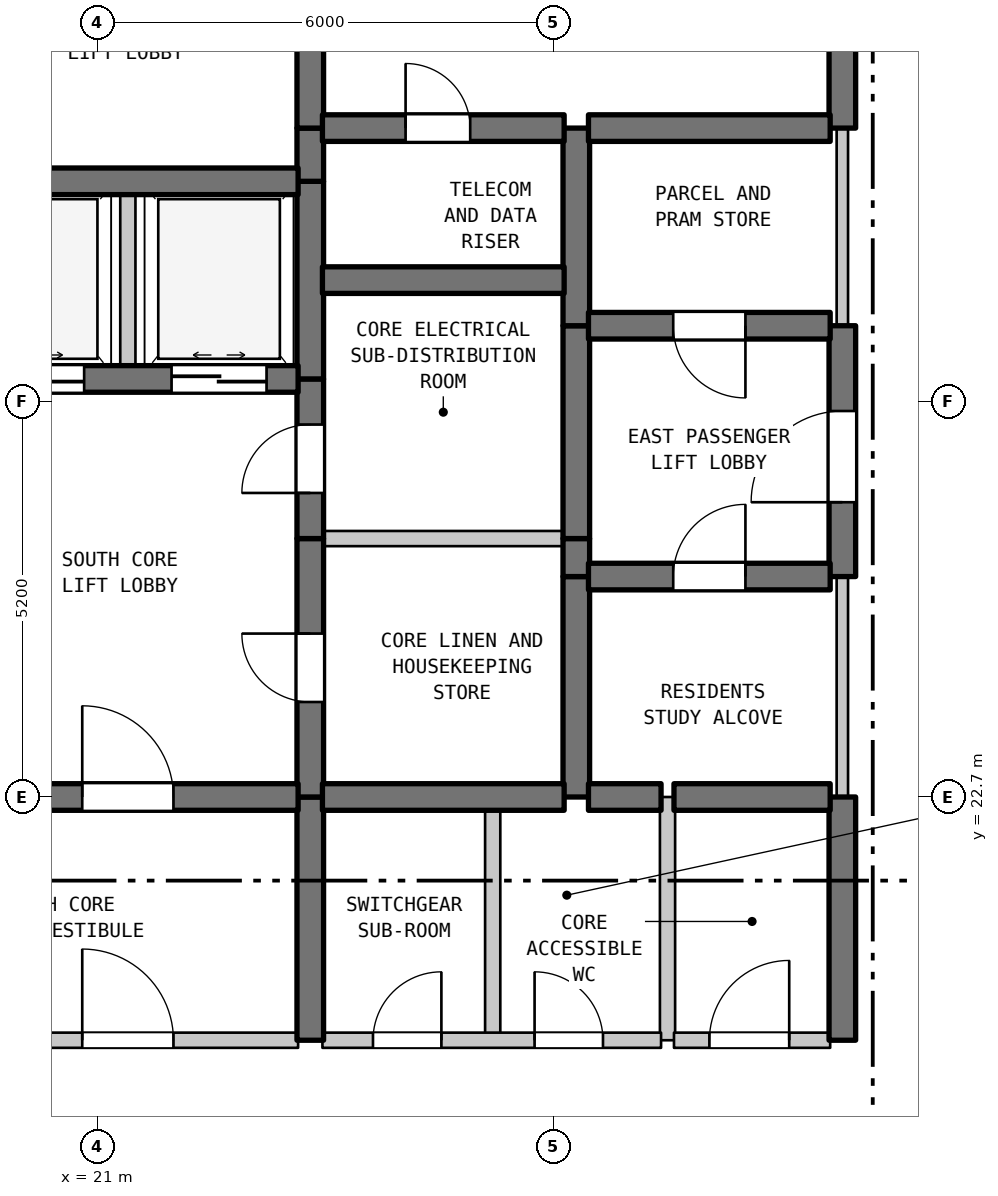
"""IFC4 building model, lengths in metres.
Left out: names, types, materials, properties, quantities, classifications, styles, units other than length and angle.
Written with IfcOpenShell. Run it as: python <this file> out.ifc"""

import sys

from ifc_helpers import new_model, si_unit, direction, frame, frame_2d, origin, place, context, subcontext, project, spatial, rectangle, extrude, element, fill, save


model = new_model("IFC4")
c1 = context("Model", 3, precision=1e-05, world=origin(), true_north=direction((0.0, 1.0)))
c2 = subcontext(c1, "Body", "Model", "MODEL_VIEW")
j1 = project(units=[si_unit("LENGTHUNIT", "METRE"), si_unit("PLANEANGLEUNIT", "RADIAN")], contexts=[c1])
p1 = place(None, origin())
s1 = spatial("IfcSite", under=j1, at=p1, CompositionType="ELEMENT")
p2 = place(p1, origin())
s2 = spatial("IfcBuilding", under=s1, at=p2, CompositionType="ELEMENT")
p3 = place(p2, frame((0.0, 0.0, 273.2)))
s3 = spatial("IfcBuildingStorey", under=s2, at=p3, CompositionType="ELEMENT", Elevation=273.2)
p4 = place(p3, frame((21.4, 28.2, 0.0), z_axis=(0.0, 0.0, 1.0), x_axis=(0.0, 1.0, 0.0)))
e1 = element("IfcWall", 1, at=p4, inside=s3, PredefinedType="STANDARD", context=c2, shape_type="SweptSolid", body=[
    extrude(rectangle(XDim=2.6, YDim=0.2, at=frame_2d((1.3, 0.0))), origin(), (0.0, 0.0, 1.0), 3.39),
])
p5 = place(p3, frame((23.8, 19.5, 0.0), z_axis=(0.0, 0.0, 1.0), x_axis=(0.0, 1.0, 0.0)))
e2 = element("IfcWall", 2, at=p5, inside=s3, PredefinedType="SHEAR", context=c2, shape_type="SweptSolid", body=[
    extrude(rectangle(XDim=3.2, YDim=0.35, at=frame_2d((1.6, 0.0))), origin(), (0.0, 0.0, 1.0), 3.39),
])
p6 = place(p3, frame((23.8, 22.7, 0.0), z_axis=(0.0, 0.0, 1.0), x_axis=(0.0, 1.0, 0.0)))
e3 = element("IfcWall", 3, at=p6, inside=s3, PredefinedType="SHEAR", context=c2, shape_type="SweptSolid", body=[
    extrude(rectangle(XDim=3.4, YDim=0.35, at=frame_2d((1.7, 0.0))), origin(), (0.0, 0.0, 1.0), 3.39),
])
p7 = place(p6, frame((1.25, 0.0, 0.0)))
e4 = element("IfcOpeningElement", 4, at=p7, cuts=e3, PredefinedType="OPENING", context=c2, shape_type="SweptSolid", body=[
    extrude(rectangle(XDim=0.9, YDim=2.15, at=frame_2d((0.45, 1.075))), frame((0.0, 0.185, 0.0), z_axis=(0.0, -1.0, 0.0), x_axis=(1.0, 0.0, 0.0)), (0.0, 0.0, 1.0), 0.37),
])
p8 = place(p3, frame((23.8, 26.1, 0.0), z_axis=(0.0, 0.0, 1.0), x_axis=(0.0, 1.0, 0.0)))
e5 = element("IfcWall", 5, at=p8, inside=s3, PredefinedType="SHEAR", context=c2, shape_type="SweptSolid", body=[
    extrude(rectangle(XDim=2.1, YDim=0.35, at=frame_2d((1.05, 0.0))), origin(), (0.0, 0.0, 1.0), 3.39),
])
p9 = place(p8, frame((0.6, 0.0, 0.0)))
e6 = element("IfcOpeningElement", 6, at=p9, cuts=e5, PredefinedType="OPENING", context=c2, shape_type="SweptSolid", body=[
    extrude(rectangle(XDim=0.9, YDim=2.15, at=frame_2d((0.45, 1.075))), frame((0.0, 0.185, 0.0), z_axis=(0.0, -1.0, 0.0), x_axis=(1.0, 0.0, 0.0)), (0.0, 0.0, 1.0), 0.37),
])
p10 = place(p3, frame((23.8, 28.2, 0.0), z_axis=(0.0, 0.0, 1.0), x_axis=(0.0, 1.0, 0.0)))
e7 = element("IfcWall", 7, at=p10, inside=s3, PredefinedType="SHEAR", context=c2, shape_type="SweptSolid", body=[
    extrude(rectangle(XDim=2.6, YDim=0.35, at=frame_2d((1.3, 0.0))), origin(), (0.0, 0.0, 1.0), 3.39),
])
p11 = place(p3, frame((23.8, 30.8, 0.0), z_axis=(0.0, 0.0, 1.0), x_axis=(0.0, 1.0, 0.0)))
e8 = element("IfcWall", 8, at=p11, inside=s3, PredefinedType="SHEAR", context=c2, shape_type="SweptSolid", body=[
    extrude(rectangle(XDim=0.7, YDim=0.35, at=frame_2d((0.35, 0.0))), origin(), (0.0, 0.0, 1.0), 3.39),
])
p12 = place(p3, frame((23.8, 31.5, 0.0), z_axis=(0.0, 0.0, 1.0), x_axis=(0.0, 1.0, 0.0)))
e9 = element("IfcWall", 9, at=p12, inside=s3, PredefinedType="SHEAR", context=c2, shape_type="SweptSolid", body=[
    extrude(rectangle(XDim=3.5, YDim=0.35, at=frame_2d((1.75, 0.0))), origin(), (0.0, 0.0, 1.0), 3.39),
])
p13 = place(p12, frame((1.127, 0.0, 0.0)))
e10 = element("IfcOpeningElement", 10, at=p13, cuts=e9, PredefinedType="OPENING", context=c2, shape_type="SweptSolid", body=[
    extrude(rectangle(XDim=1.1, YDim=2.15, at=frame_2d((0.55, 1.075))), frame((0.0, 0.185, 0.0), z_axis=(0.0, -1.0, 0.0), x_axis=(1.0, 0.0, 0.0)), (0.0, 0.0, 1.0), 0.37),
])
p14 = place(p3, frame((26.2, 19.5, 0.0), z_axis=(0.0, 0.0, 1.0), x_axis=(0.0, 1.0, 0.0)))
e11 = element("IfcWall", 11, at=p14, inside=s3, PredefinedType="STANDARD", context=c2, shape_type="SweptSolid", body=[
    extrude(rectangle(XDim=3.2, YDim=0.2, at=frame_2d((1.6, 0.0))), origin(), (0.0, 0.0, 1.0), 3.39),
])
p15 = place(p3, frame((27.3, 22.7, 0.0), z_axis=(0.0, 0.0, 1.0), x_axis=(0.0, 1.0, 0.0)))
e12 = element("IfcWall", 12, at=p15, inside=s3, PredefinedType="SHEAR", context=c2, shape_type="SweptSolid", body=[
    extrude(rectangle(XDim=2.9, YDim=0.35, at=frame_2d((1.45, 0.0))), origin(), (0.0, 0.0, 1.0), 3.39),
])
p16 = place(p3, frame((27.3, 25.6, 0.0), z_axis=(0.0, 0.0, 1.0), x_axis=(0.0, 1.0, 0.0)))
e13 = element("IfcWall", 13, at=p16, inside=s3, PredefinedType="SHEAR", context=c2, shape_type="SweptSolid", body=[
    extrude(rectangle(XDim=0.5, YDim=0.35, at=frame_2d((0.25, 0.0))), origin(), (0.0, 0.0, 1.0), 3.39),
])
p17 = place(p3, frame((27.3, 26.1, 0.0), z_axis=(0.0, 0.0, 1.0), x_axis=(0.0, 1.0, 0.0)))
e14 = element("IfcWall", 14, at=p17, inside=s3, PredefinedType="SHEAR", context=c2, shape_type="SweptSolid", body=[
    extrude(rectangle(XDim=2.8, YDim=0.35, at=frame_2d((1.4, 0.0))), origin(), (0.0, 0.0, 1.0), 3.39),
])
p18 = place(p3, frame((27.3, 28.9, 0.0), z_axis=(0.0, 0.0, 1.0), x_axis=(0.0, 1.0, 0.0)))
e15 = element("IfcWall", 15, at=p18, inside=s3, PredefinedType="SHEAR", context=c2, shape_type="SweptSolid", body=[
    extrude(rectangle(XDim=2.6, YDim=0.35, at=frame_2d((1.3, 0.0))), origin(), (0.0, 0.0, 1.0), 3.39),
])
p19 = place(p3, frame((28.5, 19.5, 0.0), z_axis=(0.0, 0.0, 1.0), x_axis=(0.0, 1.0, 0.0)))
e16 = element("IfcWall", 16, at=p19, inside=s3, PredefinedType="STANDARD", context=c2, shape_type="SweptSolid", body=[
    extrude(rectangle(XDim=3.2, YDim=0.2, at=frame_2d((1.6, 0.0))), origin(), (0.0, 0.0, 1.0), 3.39),
])
p20 = place(p3, frame((30.8, 19.5, 0.0), z_axis=(0.0, 0.0, 1.0), x_axis=(0.0, 1.0, 0.0)))
e17 = element("IfcWall", 17, at=p20, inside=s3, PredefinedType="SHEAR", context=c2, shape_type="SweptSolid", body=[
    extrude(rectangle(XDim=3.2, YDim=0.35, at=frame_2d((1.6, 0.0))), origin(), (0.0, 0.0, 1.0), 3.39),
])
p21 = place(p3, frame((30.8, 22.7, 0.0), z_axis=(0.0, 0.0, 1.0), x_axis=(0.0, 1.0, 0.0)))
e18 = element("IfcWall", 18, at=p21, inside=s3, PredefinedType="STANDARD", context=c2, shape_type="SweptSolid", body=[
    extrude(rectangle(XDim=2.9, YDim=0.15, at=frame_2d((1.45, 0.0))), origin(), (0.0, 0.0, 1.0), 3.39),
])
p22 = place(p3, frame((30.8, 25.6, 0.0), z_axis=(0.0, 0.0, 1.0), x_axis=(0.0, 1.0, 0.0)))
e19 = element("IfcWall", 19, at=p22, inside=s3, PredefinedType="SHEAR", context=c2, shape_type="SweptSolid", body=[
    extrude(rectangle(XDim=3.3, YDim=0.35, at=frame_2d((1.65, 0.0))), origin(), (0.0, 0.0, 1.0), 3.39),
])
p23 = place(p22, frame((0.978, 0.0, 0.0)))
e20 = element("IfcOpeningElement", 20, at=p23, cuts=e19, PredefinedType="OPENING", context=c2, shape_type="SweptSolid", body=[
    extrude(rectangle(XDim=1.2, YDim=2.2, at=frame_2d((0.6, 1.1))), frame((0.0, 0.185, 0.0), z_axis=(0.0, -1.0, 0.0), x_axis=(1.0, 0.0, 0.0)), (0.0, 0.0, 1.0), 0.37),
])
p24 = place(p3, frame((30.8, 28.9, 0.0), z_axis=(0.0, 0.0, 1.0), x_axis=(0.0, 1.0, 0.0)))
e21 = element("IfcWall", 21, at=p24, inside=s3, PredefinedType="STANDARD", context=c2, shape_type="SweptSolid", body=[
    extrude(rectangle(XDim=2.6, YDim=0.15, at=frame_2d((1.3, 0.0))), origin(), (0.0, 0.0, 1.0), 3.39),
])
p25 = place(p3, frame((30.8, 31.5, 0.0), z_axis=(0.0, 0.0, 1.0), x_axis=(0.0, 1.0, 0.0)))
e22 = element("IfcWall", 22, at=p25, inside=s3, PredefinedType="SHEAR", context=c2, shape_type="SweptSolid", body=[
    extrude(rectangle(XDim=3.5, YDim=0.35, at=frame_2d((1.75, 0.0))), origin(), (0.0, 0.0, 1.0), 3.39),
])
p26 = place(p25, frame((1.15, 0.0, 0.0)))
e23 = element("IfcOpeningElement", 23, at=p26, cuts=e22, PredefinedType="OPENING", context=c2, shape_type="SweptSolid", body=[
    extrude(rectangle(XDim=1.2, YDim=2.2, at=frame_2d((0.6, 1.1))), frame((0.0, 0.185, 0.0), z_axis=(0.0, -1.0, 0.0), x_axis=(1.0, 0.0, 0.0)), (0.0, 0.0, 1.0), 0.37),
])
p27 = place(p3, frame((19.16, 19.5, 0.0), z_axis=(0.0, 0.0, 1.0), x_axis=(1.0, 0.0, 0.0)))
e24 = element("IfcWall", 24, at=p27, inside=s3, PredefinedType="STANDARD", context=c2, shape_type="SweptSolid", body=[
    extrude(rectangle(XDim=4.48, YDim=0.2, at=frame_2d((2.24, 0.0))), origin(), (0.0, 0.0, 1.0), 3.39),
])
p28 = place(p27, frame((1.64, 0.0, 0.0)))
e25 = element("IfcOpeningElement", 25, at=p28, cuts=e24, PredefinedType="OPENING", context=c2, shape_type="SweptSolid", body=[
    extrude(rectangle(XDim=1.2, YDim=2.2, at=frame_2d((0.6, 1.1))), frame((0.0, 0.11, 0.0), z_axis=(0.0, -1.0, 0.0), x_axis=(1.0, 0.0, 0.0)), (0.0, 0.0, 1.0), 0.22),
])
p29 = place(p3, frame((23.96, 19.5, 0.0), z_axis=(0.0, 0.0, 1.0), x_axis=(1.0, 0.0, 0.0)))
e26 = element("IfcWall", 26, at=p29, inside=s3, PredefinedType="STANDARD", context=c2, shape_type="SweptSolid", body=[
    extrude(rectangle(XDim=4.455, YDim=0.2, at=frame_2d((2.228, 0.0))), origin(), (0.0, 0.0, 1.0), 3.39),
])
p30 = place(p29, frame((0.665, 0.0, 0.0)))
e27 = element("IfcOpeningElement", 27, at=p30, cuts=e26, PredefinedType="OPENING", context=c2, shape_type="SweptSolid", body=[
    extrude(rectangle(XDim=0.9, YDim=2.15, at=frame_2d((0.45, 1.075))), frame((0.0, 0.11, 0.0), z_axis=(0.0, -1.0, 0.0), x_axis=(1.0, 0.0, 0.0)), (0.0, 0.0, 1.0), 0.22),
])
p31 = place(p29, frame((2.791, 0.0, 0.0)))
e28 = element("IfcOpeningElement", 28, at=p31, cuts=e26, PredefinedType="OPENING", context=c2, shape_type="SweptSolid", body=[
    extrude(rectangle(XDim=0.9, YDim=2.15, at=frame_2d((0.45, 1.075))), frame((0.0, 0.11, 0.0), z_axis=(0.0, -1.0, 0.0), x_axis=(1.0, 0.0, 0.0)), (0.0, 0.0, 1.0), 0.22),
])
p32 = place(p3, frame((28.585, 19.5, 0.0), z_axis=(0.0, 0.0, 1.0), x_axis=(1.0, 0.0, 0.0)))
e29 = element("IfcWall", 29, at=p32, inside=s3, PredefinedType="STANDARD", context=c2, shape_type="SweptSolid", body=[
    extrude(rectangle(XDim=2.055, YDim=0.2, at=frame_2d((1.027, 0.0))), origin(), (0.0, 0.0, 1.0), 3.39),
])
p33 = place(p32, frame((0.466, 0.0, 0.0)))
e30 = element("IfcOpeningElement", 30, at=p33, cuts=e29, PredefinedType="OPENING", context=c2, shape_type="SweptSolid", body=[
    extrude(rectangle(XDim=1.05, YDim=2.15, at=frame_2d((0.525, 1.075))), frame((0.0, 0.11, 0.0), z_axis=(0.0, -1.0, 0.0), x_axis=(1.0, 0.0, 0.0)), (0.0, 0.0, 1.0), 0.22),
])
p34 = place(p3, frame((19.16, 22.7, 0.0), z_axis=(0.0, 0.0, 1.0), x_axis=(1.0, 0.0, 0.0)))
e31 = element("IfcWall", 31, at=p34, inside=s3, PredefinedType="SHEAR", context=c2, shape_type="SweptSolid", body=[
    extrude(rectangle(XDim=4.48, YDim=0.35, at=frame_2d((2.24, 0.0))), origin(), (0.0, 0.0, 1.0), 3.39),
])
p35 = place(p34, frame((1.64, 0.0, 0.0)))
e32 = element("IfcOpeningElement", 32, at=p35, cuts=e31, PredefinedType="OPENING", context=c2, shape_type="SweptSolid", body=[
    extrude(rectangle(XDim=1.2, YDim=2.2, at=frame_2d((0.6, 1.1))), frame((0.0, 0.185, 0.0), z_axis=(0.0, -1.0, 0.0), x_axis=(1.0, 0.0, 0.0)), (0.0, 0.0, 1.0), 0.37),
])
p36 = place(p3, frame((23.96, 22.7, 0.0), z_axis=(0.0, 0.0, 1.0), x_axis=(1.0, 0.0, 0.0)))
e33 = element("IfcWall", 33, at=p36, inside=s3, PredefinedType="SHEAR", context=c2, shape_type="SweptSolid", body=[
    extrude(rectangle(XDim=3.18, YDim=0.35, at=frame_2d((1.59, 0.0))), origin(), (0.0, 0.0, 1.0), 3.39),
])
p37 = place(p3, frame((27.46, 22.7, 0.0), z_axis=(0.0, 0.0, 1.0), x_axis=(1.0, 0.0, 0.0)))
e34 = element("IfcWall", 34, at=p37, inside=s3, PredefinedType="SHEAR", context=c2, shape_type="SweptSolid", body=[
    extrude(rectangle(XDim=0.955, YDim=0.35, at=frame_2d((0.478, 0.0))), origin(), (0.0, 0.0, 1.0), 3.39),
])
p38 = place(p3, frame((28.585, 22.7, 0.0), z_axis=(0.0, 0.0, 1.0), x_axis=(1.0, 0.0, 0.0)))
e35 = element("IfcWall", 35, at=p38, inside=s3, PredefinedType="SHEAR", context=c2, shape_type="SweptSolid", body=[
    extrude(rectangle(XDim=2.055, YDim=0.35, at=frame_2d((1.027, 0.0))), origin(), (0.0, 0.0, 1.0), 3.39),
])
p39 = place(p3, frame((27.46, 25.6, 0.0), z_axis=(0.0, 0.0, 1.0), x_axis=(1.0, 0.0, 0.0)))
e36 = element("IfcWall", 36, at=p39, inside=s3, PredefinedType="SHEAR", context=c2, shape_type="SweptSolid", body=[
    extrude(rectangle(XDim=3.18, YDim=0.35, at=frame_2d((1.59, 0.0))), origin(), (0.0, 0.0, 1.0), 3.39),
])
p40 = place(p39, frame((1.115, 0.0, 0.0)))
e37 = element("IfcOpeningElement", 37, at=p40, cuts=e36, PredefinedType="OPENING", context=c2, shape_type="SweptSolid", body=[
    extrude(rectangle(XDim=0.95, YDim=2.15, at=frame_2d((0.475, 1.075))), frame((0.0, 0.185, 0.0), z_axis=(0.0, -1.0, 0.0), x_axis=(1.0, 0.0, 0.0)), (0.0, 0.0, 1.0), 0.37),
])
p41 = place(p3, frame((23.96, 26.1, 0.0), z_axis=(0.0, 0.0, 1.0), x_axis=(1.0, 0.0, 0.0)))
e38 = element("IfcWall", 38, at=p41, inside=s3, PredefinedType="STANDARD", context=c2, shape_type="SweptSolid", body=[
    extrude(rectangle(XDim=3.18, YDim=0.2, at=frame_2d((1.59, 0.0))), origin(), (0.0, 0.0, 1.0), 3.39),
])
p42 = place(p3, frame((19.16, 28.2, 0.0), z_axis=(0.0, 0.0, 1.0), x_axis=(1.0, 0.0, 0.0)))
e39 = element("IfcWall", 39, at=p42, inside=s3, PredefinedType="SHEAR", context=c2, shape_type="SweptSolid", body=[
    extrude(rectangle(XDim=4.48, YDim=0.35, at=frame_2d((2.24, 0.0))), origin(), (0.0, 0.0, 1.0), 3.39),
])
p43 = place(p42, frame((0.415, 0.0, 0.0)))
e40 = element("IfcOpeningElement", 40, at=p43, cuts=e39, PredefinedType="OPENING", context=c2, shape_type="SweptSolid", body=[
    extrude(rectangle(XDim=1.25, YDim=2.2, at=frame_2d((0.625, 1.1))), frame((0.0, 0.185, 0.0), z_axis=(0.0, -1.0, 0.0), x_axis=(1.0, 0.0, 0.0)), (0.0, 0.0, 1.0), 0.37),
])
p44 = place(p42, frame((2.815, 0.0, 0.0)))
e41 = element("IfcOpeningElement", 41, at=p44, cuts=e39, PredefinedType="OPENING", context=c2, shape_type="SweptSolid", body=[
    extrude(rectangle(XDim=1.25, YDim=2.2, at=frame_2d((0.625, 1.1))), frame((0.0, 0.185, 0.0), z_axis=(0.0, -1.0, 0.0), x_axis=(1.0, 0.0, 0.0)), (0.0, 0.0, 1.0), 0.37),
])
p45 = place(p3, frame((27.46, 28.9, 0.0), z_axis=(0.0, 0.0, 1.0), x_axis=(1.0, 0.0, 0.0)))
e42 = element("IfcWall", 42, at=p45, inside=s3, PredefinedType="SHEAR", context=c2, shape_type="SweptSolid", body=[
    extrude(rectangle(XDim=3.18, YDim=0.35, at=frame_2d((1.59, 0.0))), origin(), (0.0, 0.0, 1.0), 3.39),
])
p46 = place(p45, frame((1.115, 0.0, 0.0)))
e43 = element("IfcOpeningElement", 43, at=p46, cuts=e42, PredefinedType="OPENING", context=c2, shape_type="SweptSolid", body=[
    extrude(rectangle(XDim=0.95, YDim=2.15, at=frame_2d((0.475, 1.075))), frame((0.0, 0.185, 0.0), z_axis=(0.0, -1.0, 0.0), x_axis=(1.0, 0.0, 0.0)), (0.0, 0.0, 1.0), 0.37),
])
p47 = place(p3, frame((23.96, 29.5, 0.0), z_axis=(0.0, 0.0, 1.0), x_axis=(1.0, 0.0, 0.0)))
e44 = element("IfcWall", 44, at=p47, inside=s3, PredefinedType="SHEAR", context=c2, shape_type="SweptSolid", body=[
    extrude(rectangle(XDim=3.18, YDim=0.35, at=frame_2d((1.59, 0.0))), origin(), (0.0, 0.0, 1.0), 3.39),
])
p48 = place(p3, frame((19.16, 30.8, 0.0), z_axis=(0.0, 0.0, 1.0), x_axis=(1.0, 0.0, 0.0)))
e45 = element("IfcWall", 45, at=p48, inside=s3, PredefinedType="SHEAR", context=c2, shape_type="SweptSolid", body=[
    extrude(rectangle(XDim=4.48, YDim=0.35, at=frame_2d((2.24, 0.0))), origin(), (0.0, 0.0, 1.0), 3.39),
])
p49 = place(p3, frame((23.96, 31.5, 0.0), z_axis=(0.0, 0.0, 1.0), x_axis=(1.0, 0.0, 0.0)))
e46 = element("IfcWall", 46, at=p49, inside=s3, PredefinedType="SHEAR", context=c2, shape_type="SweptSolid", body=[
    extrude(rectangle(XDim=3.18, YDim=0.35, at=frame_2d((1.59, 0.0))), origin(), (0.0, 0.0, 1.0), 3.39),
])
p50 = place(p49, frame((1.094, 0.0, 0.0)))
e47 = element("IfcOpeningElement", 47, at=p50, cuts=e46, PredefinedType="OPENING", context=c2, shape_type="SweptSolid", body=[
    extrude(rectangle(XDim=0.85, YDim=2.1, at=frame_2d((0.425, 1.05))), frame((0.0, 0.185, 0.0), z_axis=(0.0, -1.0, 0.0), x_axis=(1.0, 0.0, 0.0)), (0.0, 0.0, 1.0), 0.37),
])
p51 = place(p3, frame((27.46, 31.5, 0.0), z_axis=(0.0, 0.0, 1.0), x_axis=(1.0, 0.0, 0.0)))
e48 = element("IfcWall", 48, at=p51, inside=s3, PredefinedType="SHEAR", context=c2, shape_type="SweptSolid", body=[
    extrude(rectangle(XDim=3.18, YDim=0.35, at=frame_2d((1.59, 0.0))), origin(), (0.0, 0.0, 1.0), 3.39),
])
p52 = place(p7, origin())
e49 = element("IfcDoor", 49, at=p52, inside=s3, OperationType="SINGLE_SWING_RIGHT", PredefinedType="DOOR", context=c2, shape_type="SweptSolid", body=[
    extrude(rectangle(XDim=0.9, YDim=2.15, at=frame_2d((0.45, 1.075))), frame((0.0, 0.025, 0.0), z_axis=(0.0, -1.0, 0.0), x_axis=(1.0, 0.0, 0.0)), (0.0, 0.0, 1.0), 0.05),
])
fill(e4, e49)
p53 = place(p9, origin())
e50 = element("IfcDoor", 50, at=p53, inside=s3, OperationType="SINGLE_SWING_LEFT", PredefinedType="DOOR", context=c2, shape_type="SweptSolid", body=[
    extrude(rectangle(XDim=0.9, YDim=2.15, at=frame_2d((0.45, 1.075))), frame((0.0, 0.025, 0.0), z_axis=(0.0, -1.0, 0.0), x_axis=(1.0, 0.0, 0.0)), (0.0, 0.0, 1.0), 0.05),
])
fill(e6, e50)
p54 = place(p23, origin())
e51 = element("IfcDoor", 51, at=p54, inside=s3, OperationType="SINGLE_SWING_LEFT", PredefinedType="DOOR", context=c2, shape_type="SweptSolid", body=[
    extrude(rectangle(XDim=1.2, YDim=2.2, at=frame_2d((0.6, 1.1))), frame((0.0, 0.025, 0.0), z_axis=(0.0, -1.0, 0.0), x_axis=(1.0, 0.0, 0.0)), (0.0, 0.0, 1.0), 0.05),
])
fill(e20, e51)
p55 = place(p28, origin())
e52 = element("IfcDoor", 52, at=p55, inside=s3, OperationType="SINGLE_SWING_LEFT", PredefinedType="DOOR", context=c2, shape_type="SweptSolid", body=[
    extrude(rectangle(XDim=1.2, YDim=2.2, at=frame_2d((0.6, 1.1))), frame((0.0, 0.025, 0.0), z_axis=(0.0, -1.0, 0.0), x_axis=(1.0, 0.0, 0.0)), (0.0, 0.0, 1.0), 0.05),
])
fill(e25, e52)
p56 = place(p30, origin())
e53 = element("IfcDoor", 53, at=p56, inside=s3, OperationType="SINGLE_SWING_RIGHT", PredefinedType="DOOR", context=c2, shape_type="SweptSolid", body=[
    extrude(rectangle(XDim=0.9, YDim=2.15, at=frame_2d((0.45, 1.075))), frame((0.0, 0.025, 0.0), z_axis=(0.0, -1.0, 0.0), x_axis=(1.0, 0.0, 0.0)), (0.0, 0.0, 1.0), 0.05),
])
fill(e27, e53)
p57 = place(p31, origin())
e54 = element("IfcDoor", 54, at=p57, inside=s3, OperationType="SINGLE_SWING_LEFT", PredefinedType="DOOR", context=c2, shape_type="SweptSolid", body=[
    extrude(rectangle(XDim=0.9, YDim=2.15, at=frame_2d((0.45, 1.075))), frame((0.0, 0.025, 0.0), z_axis=(0.0, -1.0, 0.0), x_axis=(1.0, 0.0, 0.0)), (0.0, 0.0, 1.0), 0.05),
])
fill(e28, e54)
p58 = place(p33, origin())
e55 = element("IfcDoor", 55, at=p58, inside=s3, OperationType="SINGLE_SWING_RIGHT", PredefinedType="DOOR", context=c2, shape_type="SweptSolid", body=[
    extrude(rectangle(XDim=1.05, YDim=2.15, at=frame_2d((0.525, 1.075))), frame((0.0, 0.025, 0.0), z_axis=(0.0, -1.0, 0.0), x_axis=(1.0, 0.0, 0.0)), (0.0, 0.0, 1.0), 0.05),
])
fill(e30, e55)
p59 = place(p35, origin())
e56 = element("IfcDoor", 56, at=p59, inside=s3, OperationType="SINGLE_SWING_LEFT", PredefinedType="DOOR", context=c2, shape_type="SweptSolid", body=[
    extrude(rectangle(XDim=1.2, YDim=2.2, at=frame_2d((0.6, 1.1))), frame((0.0, 0.025, 0.0), z_axis=(0.0, -1.0, 0.0), x_axis=(1.0, 0.0, 0.0)), (0.0, 0.0, 1.0), 0.05),
])
fill(e32, e56)
p60 = place(p40, origin())
e57 = element("IfcDoor", 57, at=p60, inside=s3, OperationType="SINGLE_SWING_RIGHT", PredefinedType="DOOR", context=c2, shape_type="SweptSolid", body=[
    extrude(rectangle(XDim=0.95, YDim=2.15, at=frame_2d((0.475, 1.075))), frame((0.0, 0.025, 0.0), z_axis=(0.0, -1.0, 0.0), x_axis=(1.0, 0.0, 0.0)), (0.0, 0.0, 1.0), 0.05),
])
fill(e37, e57)
p61 = place(p43, origin())
e58 = element("IfcDoor", 58, at=p61, inside=s3, OperationType="DOUBLE_DOOR_SLIDING", PredefinedType="DOOR", context=c2, shape_type="SweptSolid", body=[
    extrude(rectangle(XDim=1.25, YDim=2.2, at=frame_2d((0.625, 1.1))), frame((0.0, 0.025, 0.0), z_axis=(0.0, -1.0, 0.0), x_axis=(1.0, 0.0, 0.0)), (0.0, 0.0, 1.0), 0.05),
])
fill(e40, e58)
p62 = place(p44, origin())
e59 = element("IfcDoor", 59, at=p62, inside=s3, OperationType="DOUBLE_DOOR_SLIDING", PredefinedType="DOOR", context=c2, shape_type="SweptSolid", body=[
    extrude(rectangle(XDim=1.25, YDim=2.2, at=frame_2d((0.625, 1.1))), frame((0.0, 0.025, 0.0), z_axis=(0.0, -1.0, 0.0), x_axis=(1.0, 0.0, 0.0)), (0.0, 0.0, 1.0), 0.05),
])
fill(e41, e59)
p63 = place(p46, frame((0.95, 0.0, 0.0), z_axis=(0.0, 0.0, 1.0), x_axis=(-1.0, 0.0, 0.0)))
e60 = element("IfcDoor", 60, at=p63, inside=s3, OperationType="SINGLE_SWING_RIGHT", PredefinedType="DOOR", context=c2, shape_type="SweptSolid", body=[
    extrude(rectangle(XDim=0.95, YDim=2.15, at=frame_2d((0.475, 1.075))), frame((0.0, 0.025, 0.0), z_axis=(0.0, -1.0, 0.0), x_axis=(1.0, 0.0, 0.0)), (0.0, 0.0, 1.0), 0.05),
])
fill(e43, e60)
p64 = place(p50, origin())
e61 = element("IfcDoor", 61, at=p64, inside=s3, OperationType="SINGLE_SWING_LEFT", PredefinedType="DOOR", context=c2, shape_type="SweptSolid", body=[
    extrude(rectangle(XDim=0.85, YDim=2.1, at=frame_2d((0.425, 1.05))), frame((0.0, 0.025, 0.0), z_axis=(0.0, -1.0, 0.0), x_axis=(1.0, 0.0, 0.0)), (0.0, 0.0, 1.0), 0.05),
])
fill(e47, e61)
save(model, sys.argv[1])
